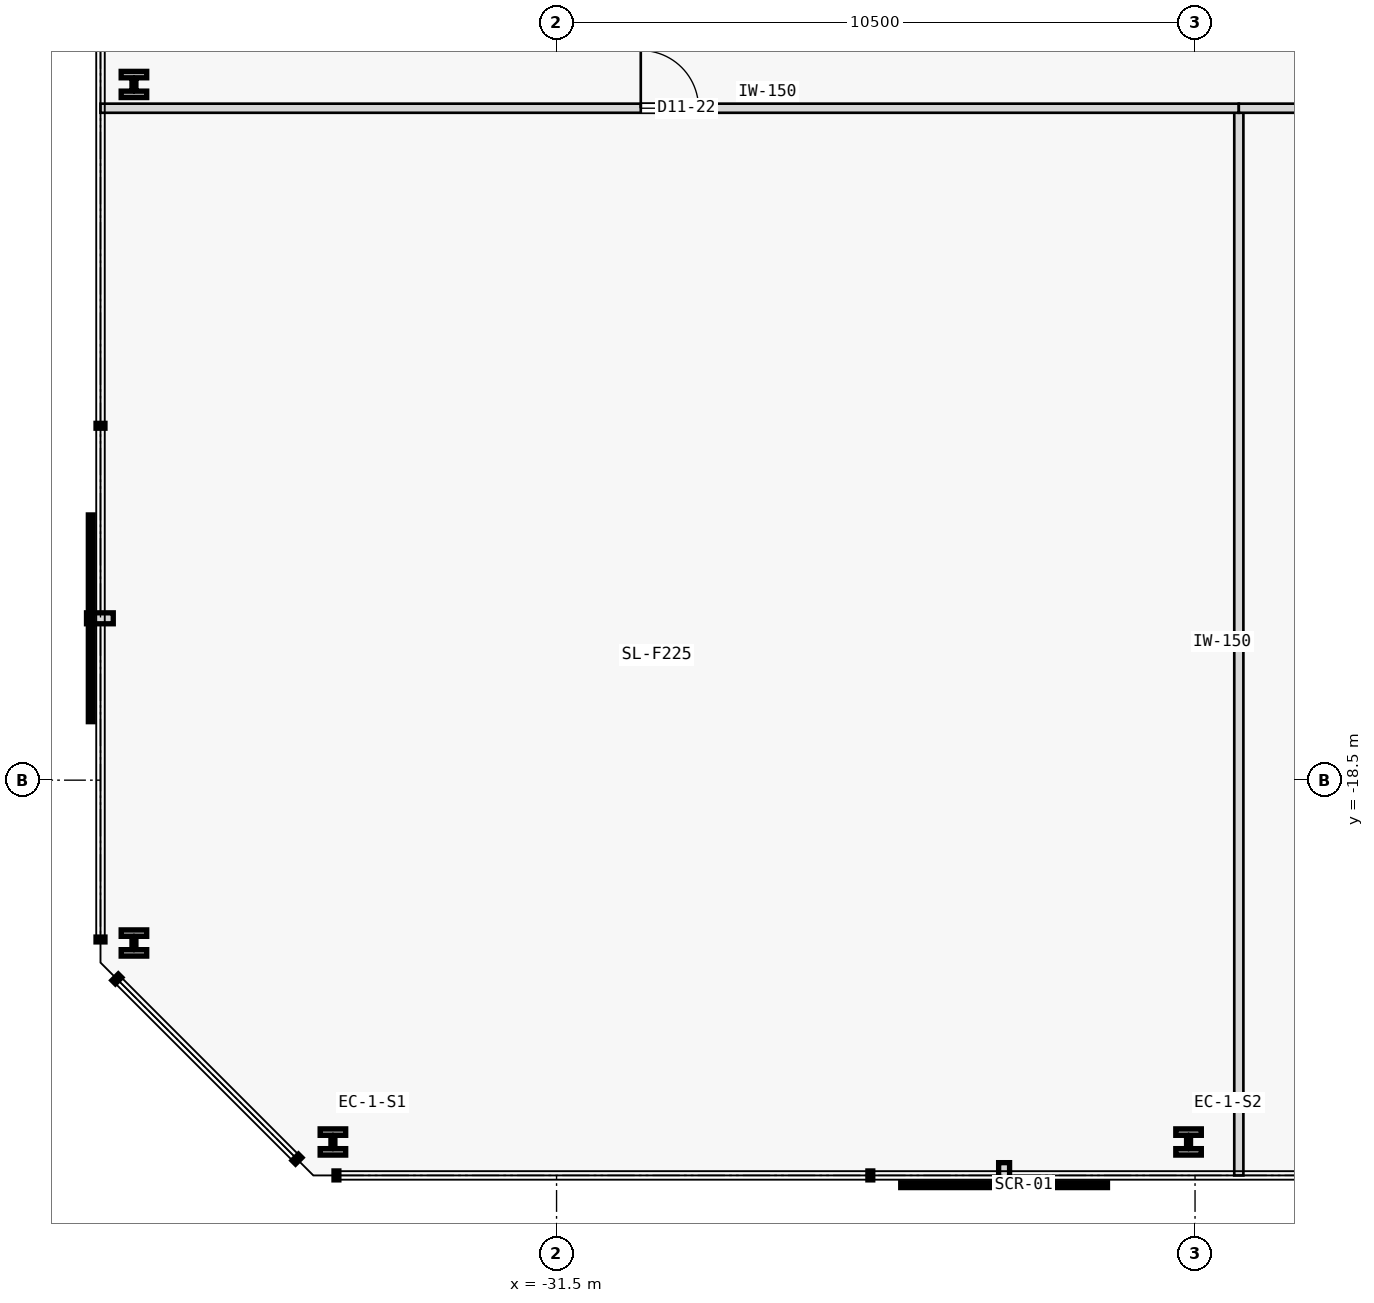
"""IFC4 building model, lengths in metres.
Left out: names, types, materials, properties, quantities, classifications, styles, units other than length and angle.
Written with IfcOpenShell. Run it as: python <this file> out.ifc"""

import sys

from ifc_helpers import new_model, si_unit, direction, frame, frame_2d, origin, origin_2d, place, context, subcontext, project, spatial, rectangle, i_section, extrude, element, fill, save


model = new_model("IFC4")
c1 = context("Model", 3, precision=1e-05, world=origin(), true_north=direction((0.0, 1.0)))
c2 = subcontext(c1, "Body", "Model", "MODEL_VIEW")
j1 = project(units=[si_unit("LENGTHUNIT", "METRE"), si_unit("PLANEANGLEUNIT", "RADIAN")], contexts=[c1])
p1 = place(None, origin())
s1 = spatial("IfcSite", under=j1, at=p1, CompositionType="ELEMENT")
p2 = place(p1, origin())
s2 = spatial("IfcBuilding", under=s1, at=p2, CompositionType="ELEMENT")
p3 = place(p2, frame((0.0, 0.0, 48.4)))
s3 = spatial("IfcBuildingStorey", under=s2, at=p3, CompositionType="ELEMENT", Elevation=48.4)
for number, where, z_axis, x_axis in (
    (1, (-35.178, -24.45, 0.0), (0.0, 0.0, 1.0), (1.0, 0.0, 0.0)),
    (2, (-21.107, -24.45, 0.0), (0.0, 0.0, 1.0), (1.0, 0.0, 0.0)),
    (3, (-38.45, -7.059, 0.0), (0.0, 0.0, 1.0), (1.0, 0.0, 0.0)),
    (4, (-38.45, -21.178, 0.0), (0.0, 0.0, 1.0), (1.0, 0.0, 0.0)),
):
    element("IfcColumn", number, at=place(p3, frame(where, z_axis=z_axis, x_axis=x_axis)), inside=s3, PredefinedType="COLUMN", context=c2, shape_type="SweptSolid", body=[
        extrude(i_section(OverallWidth=0.42, OverallDepth=0.431, WebThickness=0.065, FlangeThickness=0.106, FilletRadius=0.015, at=origin_2d()), origin(), (0.0, 0.0, 1.0), 3.8),
    ])
p4 = place(p3, frame((-20.28, -25.0, 0.0), z_axis=(0.0, 0.0, 1.0), x_axis=(0.0, 1.0, 0.0)))
e5 = element("IfcWall", 5, at=p4, inside=s3, PredefinedType="PARTITIONING", context=c2, shape_type="SweptSolid", body=[
    extrude(rectangle(XDim=17.55, YDim=0.15, at=frame_2d((8.775, 0.0))), origin(), (0.0, 0.0, 1.0), 3.575),
])
p5 = place(p3, frame((-39.0, -7.45, 0.0), z_axis=(0.0, 0.0, 1.0), x_axis=(1.0, 0.0, 0.0)))
e6 = element("IfcWall", 6, at=p5, inside=s3, PredefinedType="PARTITIONING", context=c2, shape_type="SweptSolid", body=[
    extrude(rectangle(XDim=18.72, YDim=0.15, at=frame_2d((9.36, 0.0))), origin(), (0.0, 0.0, 1.0), 3.575),
])
p6 = place(p5, frame((8.885, 0.0, 0.0)))
e7 = element("IfcOpeningElement", 7, at=p6, cuts=e6, PredefinedType="OPENING", context=c2, shape_type="SweptSolid", body=[
    extrude(rectangle(XDim=0.95, YDim=2.15, at=frame_2d((0.475, 1.075))), frame((0.0, 0.085, 0.0), z_axis=(0.0, -1.0, 0.0), x_axis=(1.0, 0.0, 0.0)), (0.0, 0.0, 1.0), 0.17),
])
p7 = place(p3, frame((-20.28, -7.45, 0.0), z_axis=(0.0, 0.0, 1.0), x_axis=(1.0, 0.0, 0.0)))
e8 = element("IfcWall", 8, at=p7, inside=s3, PredefinedType="PARTITIONING", context=c2, shape_type="SweptSolid", body=[
    extrude(rectangle(XDim=3.221, YDim=0.15, at=frame_2d((1.61, 0.0))), origin(), (0.0, 0.0, 1.0), 3.575),
])
p8 = place(p6, origin())
e9 = element("IfcDoor", 9, at=p8, inside=s3, OperationType="SINGLE_SWING_LEFT", PredefinedType="DOOR", context=c2, shape_type="SweptSolid", body=[
    extrude(rectangle(XDim=0.95, YDim=2.15, at=frame_2d((0.475, 1.075))), frame((0.0, 0.025, 0.0), z_axis=(0.0, -1.0, 0.0), x_axis=(1.0, 0.0, 0.0)), (0.0, 0.0, 1.0), 0.05),
])
fill(e7, e9)
save(model, sys.argv[1])
